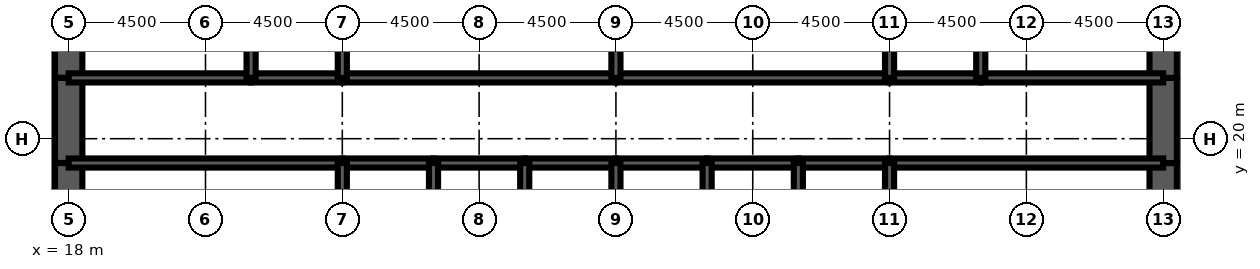
"""IFC4 building model, lengths in metres.
Left out: names, types, materials, properties, quantities, classifications, styles, units other than length and angle.
Written with IfcOpenShell. Run it as: python <this file> out.ifc"""

import sys

from ifc_helpers import new_model, si_unit, direction, frame, frame_2d, origin, place, context, subcontext, project, spatial, rectangle, extrude, element, fill, save


model = new_model("IFC4")
c1 = context("Model", 3, precision=1e-05, world=origin(), true_north=direction((0.0, 1.0)))
c2 = subcontext(c1, "Body", "Model", "MODEL_VIEW")
j1 = project(units=[si_unit("LENGTHUNIT", "METRE"), si_unit("PLANEANGLEUNIT", "RADIAN")], contexts=[c1])
p1 = place(None, origin())
s1 = spatial("IfcSite", under=j1, at=p1, CompositionType="ELEMENT")
p2 = place(p1, origin())
s2 = spatial("IfcBuilding", under=s1, at=p2, CompositionType="ELEMENT")
p3 = place(p2, frame((0.0, 0.0, 18.0)))
s3 = spatial("IfcBuildingStorey", under=s2, at=p3, CompositionType="ELEMENT", Elevation=18.0)
p4 = place(p3, frame((18.0, 26.0, 0.0), z_axis=(0.0, 0.0, 1.0), x_axis=(0.0, -1.0, 0.0)))
e1 = element("IfcWall", 1, at=p4, inside=s3, PredefinedType="SHEAR", context=c2, shape_type="SweptSolid", body=[
    extrude(rectangle(XDim=4.0, YDim=0.9, at=frame_2d((2.0, 0.0))), origin(), (0.0, 0.0, 1.0), 5.0),
])
p5 = place(p3, frame((18.0, 22.0, 0.0), z_axis=(0.0, 0.0, 1.0), x_axis=(0.0, -1.0, 0.0)))
e2 = element("IfcWall", 2, at=p5, inside=s3, PredefinedType="SHEAR", context=c2, shape_type="SweptSolid", body=[
    extrude(rectangle(XDim=2.8, YDim=0.9, at=frame_2d((1.4, 0.0))), origin(), (0.0, 0.0, 1.0), 5.0),
])
p6 = place(p5, frame((0.6, 0.0, 0.0)))
e3 = element("IfcOpeningElement", 3, at=p6, cuts=e2, PredefinedType="OPENING", context=c2, shape_type="SweptSolid", body=[
    extrude(rectangle(XDim=1.8, YDim=2.1, at=frame_2d((0.9, 1.05))), frame((0.0, 0.46, 0.0), z_axis=(0.0, -1.0, 0.0), x_axis=(1.0, 0.0, 0.0)), (0.0, 0.0, 1.0), 0.92),
])
for number, where, z_axis, x_axis in (
    (4, (18.0, 19.2, 0.0), (0.0, 0.0, 1.0), (0.0, -1.0, 0.0)),
    (5, (54.0, 16.0, 0.0), (0.0, 0.0, 1.0), (0.0, 1.0, 0.0)),
):
    element("IfcWall", number, at=place(p3, frame(where, z_axis=z_axis, x_axis=x_axis)), inside=s3, PredefinedType="SHEAR", context=c2, shape_type="SweptSolid", body=[
        extrude(rectangle(XDim=3.2, YDim=0.9, at=frame_2d((1.6, 0.0))), origin(), (0.0, 0.0, 1.0), 5.0),
    ])
p7 = place(p3, frame((54.0, 19.2, 0.0), z_axis=(0.0, 0.0, 1.0), x_axis=(0.0, 1.0, 0.0)))
e6 = element("IfcWall", 6, at=p7, inside=s3, PredefinedType="SHEAR", context=c2, shape_type="SweptSolid", body=[
    extrude(rectangle(XDim=2.8, YDim=0.9, at=frame_2d((1.4, 0.0))), origin(), (0.0, 0.0, 1.0), 5.0),
])
p8 = place(p7, frame((0.4, 0.0, 0.0)))
e7 = element("IfcOpeningElement", 7, at=p8, cuts=e6, PredefinedType="OPENING", context=c2, shape_type="SweptSolid", body=[
    extrude(rectangle(XDim=1.8, YDim=2.1, at=frame_2d((0.9, 1.05))), frame((0.0, 0.46, 0.0), z_axis=(0.0, -1.0, 0.0), x_axis=(1.0, 0.0, 0.0)), (0.0, 0.0, 1.0), 0.92),
])
p9 = place(p3, frame((54.0, 22.0, 0.0), z_axis=(0.0, 0.0, 1.0), x_axis=(0.0, 1.0, 0.0)))
e8 = element("IfcWall", 8, at=p9, inside=s3, PredefinedType="SHEAR", context=c2, shape_type="SweptSolid", body=[
    extrude(rectangle(XDim=4.0, YDim=0.9, at=frame_2d((2.0, 0.0))), origin(), (0.0, 0.0, 1.0), 5.0),
])
p10 = place(p3, frame((18.0, 19.2, 0.0), z_axis=(0.0, 0.0, 1.0), x_axis=(1.0, 0.0, 0.0)))
e9 = element("IfcWall", 9, at=p10, inside=s3, PredefinedType="SOLIDWALL", context=c2, shape_type="SweptSolid", body=[
    extrude(rectangle(XDim=9.0, YDim=0.3, at=frame_2d((4.5, 0.0))), origin(), (0.0, 0.0, 1.0), 5.0),
])
p11 = place(p10, frame((0.65, 0.0, 0.0)))
e10 = element("IfcOpeningElement", 10, at=p11, cuts=e9, PredefinedType="OPENING", context=c2, shape_type="SweptSolid", body=[
    extrude(rectangle(XDim=1.0, YDim=2.1, at=frame_2d((0.5, 1.05))), frame((0.0, 0.16, 0.0), z_axis=(0.0, -1.0, 0.0), x_axis=(1.0, 0.0, 0.0)), (0.0, 0.0, 1.0), 0.32),
])
p12 = place(p3, frame((27.0, 19.2, 0.0), z_axis=(0.0, 0.0, 1.0), x_axis=(1.0, 0.0, 0.0)))
e11 = element("IfcWall", 11, at=p12, inside=s3, PredefinedType="SOLIDWALL", context=c2, shape_type="SweptSolid", body=[
    extrude(rectangle(XDim=3.0, YDim=0.3, at=frame_2d((1.5, 0.0))), origin(), (0.0, 0.0, 1.0), 5.0),
])
p13 = place(p12, frame((0.95, 0.0, 0.0)))
e12 = element("IfcOpeningElement", 12, at=p13, cuts=e11, PredefinedType="OPENING", context=c2, shape_type="SweptSolid", body=[
    extrude(rectangle(XDim=1.1, YDim=2.2, at=frame_2d((0.55, 1.1))), frame((0.0, 0.16, 0.0), z_axis=(0.0, -1.0, 0.0), x_axis=(1.0, 0.0, 0.0)), (0.0, 0.0, 1.0), 0.32),
])
p14 = place(p3, frame((30.0, 19.2, 0.0), z_axis=(0.0, 0.0, 1.0), x_axis=(1.0, 0.0, 0.0)))
e13 = element("IfcWall", 13, at=p14, inside=s3, PredefinedType="SOLIDWALL", context=c2, shape_type="SweptSolid", body=[
    extrude(rectangle(XDim=3.0, YDim=0.3, at=frame_2d((1.5, 0.0))), origin(), (0.0, 0.0, 1.0), 5.0),
])
p15 = place(p14, frame((0.95, 0.0, 0.0)))
e14 = element("IfcOpeningElement", 14, at=p15, cuts=e13, PredefinedType="OPENING", context=c2, shape_type="SweptSolid", body=[
    extrude(rectangle(XDim=1.1, YDim=2.2, at=frame_2d((0.55, 1.1))), frame((0.0, 0.16, 0.0), z_axis=(0.0, -1.0, 0.0), x_axis=(1.0, 0.0, 0.0)), (0.0, 0.0, 1.0), 0.32),
])
p16 = place(p3, frame((33.0, 19.2, 0.0), z_axis=(0.0, 0.0, 1.0), x_axis=(1.0, 0.0, 0.0)))
e15 = element("IfcWall", 15, at=p16, inside=s3, PredefinedType="SOLIDWALL", context=c2, shape_type="SweptSolid", body=[
    extrude(rectangle(XDim=3.0, YDim=0.3, at=frame_2d((1.5, 0.0))), origin(), (0.0, 0.0, 1.0), 5.0),
])
p17 = place(p16, frame((0.95, 0.0, 0.0)))
e16 = element("IfcOpeningElement", 16, at=p17, cuts=e15, PredefinedType="OPENING", context=c2, shape_type="SweptSolid", body=[
    extrude(rectangle(XDim=1.1, YDim=2.2, at=frame_2d((0.55, 1.1))), frame((0.0, 0.16, 0.0), z_axis=(0.0, -1.0, 0.0), x_axis=(1.0, 0.0, 0.0)), (0.0, 0.0, 1.0), 0.32),
])
p18 = place(p3, frame((36.0, 19.2, 0.0), z_axis=(0.0, 0.0, 1.0), x_axis=(1.0, 0.0, 0.0)))
e17 = element("IfcWall", 17, at=p18, inside=s3, PredefinedType="SOLIDWALL", context=c2, shape_type="SweptSolid", body=[
    extrude(rectangle(XDim=3.0, YDim=0.3, at=frame_2d((1.5, 0.0))), origin(), (0.0, 0.0, 1.0), 5.0),
])
p19 = place(p18, frame((0.95, 0.0, 0.0)))
e18 = element("IfcOpeningElement", 18, at=p19, cuts=e17, PredefinedType="OPENING", context=c2, shape_type="SweptSolid", body=[
    extrude(rectangle(XDim=1.1, YDim=2.2, at=frame_2d((0.55, 1.1))), frame((0.0, 0.16, 0.0), z_axis=(0.0, -1.0, 0.0), x_axis=(1.0, 0.0, 0.0)), (0.0, 0.0, 1.0), 0.32),
])
for number, where, z_axis, x_axis in (
    (19, (39.0, 19.2, 0.0), (0.0, 0.0, 1.0), (1.0, 0.0, 0.0)),
    (20, (42.0, 19.2, 0.0), (0.0, 0.0, 1.0), (1.0, 0.0, 0.0)),
):
    element("IfcWall", number, at=place(p3, frame(where, z_axis=z_axis, x_axis=x_axis)), inside=s3, PredefinedType="SOLIDWALL", context=c2, shape_type="SweptSolid", body=[
        extrude(rectangle(XDim=3.0, YDim=0.3, at=frame_2d((1.5, 0.0))), origin(), (0.0, 0.0, 1.0), 5.0),
    ])
p20 = place(p3, frame((45.0, 19.2, 0.0), z_axis=(0.0, 0.0, 1.0), x_axis=(1.0, 0.0, 0.0)))
e21 = element("IfcWall", 21, at=p20, inside=s3, PredefinedType="SOLIDWALL", context=c2, shape_type="SweptSolid", body=[
    extrude(rectangle(XDim=9.0, YDim=0.3, at=frame_2d((4.5, 0.0))), origin(), (0.0, 0.0, 1.0), 5.0),
])
p21 = place(p20, frame((7.35, 0.0, 0.0)))
e22 = element("IfcOpeningElement", 22, at=p21, cuts=e21, PredefinedType="OPENING", context=c2, shape_type="SweptSolid", body=[
    extrude(rectangle(XDim=1.0, YDim=2.1, at=frame_2d((0.5, 1.05))), frame((0.0, 0.16, 0.0), z_axis=(0.0, -1.0, 0.0), x_axis=(1.0, 0.0, 0.0)), (0.0, 0.0, 1.0), 0.32),
])
p22 = place(p3, frame((18.0, 22.0, 0.0), z_axis=(0.0, 0.0, 1.0), x_axis=(1.0, 0.0, 0.0)))
e23 = element("IfcWall", 23, at=p22, inside=s3, PredefinedType="SOLIDWALL", context=c2, shape_type="SweptSolid", body=[
    extrude(rectangle(XDim=6.0, YDim=0.3, at=frame_2d((3.0, 0.0))), origin(), (0.0, 0.0, 1.0), 5.0),
])
p23 = place(p22, frame((4.4, 0.0, 0.0)))
e24 = element("IfcOpeningElement", 24, at=p23, cuts=e23, PredefinedType="OPENING", context=c2, shape_type="SweptSolid", body=[
    extrude(rectangle(XDim=1.0, YDim=2.1, at=frame_2d((0.5, 1.05))), frame((0.0, 0.16, 0.0), z_axis=(0.0, -1.0, 0.0), x_axis=(1.0, 0.0, 0.0)), (0.0, 0.0, 1.0), 0.32),
])
p24 = place(p22, frame((1.0, 0.0, 0.0)))
e25 = element("IfcOpeningElement", 25, at=p24, cuts=e23, PredefinedType="OPENING", context=c2, shape_type="SweptSolid", body=[
    extrude(rectangle(XDim=1.0, YDim=2.1, at=frame_2d((0.5, 1.05))), frame((0.0, 0.16, 0.0), z_axis=(0.0, -1.0, 0.0), x_axis=(1.0, 0.0, 0.0)), (0.0, 0.0, 1.0), 0.32),
])
p25 = place(p3, frame((24.0, 22.0, 0.0), z_axis=(0.0, 0.0, 1.0), x_axis=(1.0, 0.0, 0.0)))
e26 = element("IfcWall", 26, at=p25, inside=s3, PredefinedType="SOLIDWALL", context=c2, shape_type="SweptSolid", body=[
    extrude(rectangle(XDim=3.0, YDim=0.3, at=frame_2d((1.5, 0.0))), origin(), (0.0, 0.0, 1.0), 5.0),
])
p26 = place(p25, frame((1.0, 0.0, 0.0)))
e27 = element("IfcOpeningElement", 27, at=p26, cuts=e26, PredefinedType="OPENING", context=c2, shape_type="SweptSolid", body=[
    extrude(rectangle(XDim=1.0, YDim=2.1, at=frame_2d((0.5, 1.05))), frame((0.0, 0.16, 0.0), z_axis=(0.0, -1.0, 0.0), x_axis=(1.0, 0.0, 0.0)), (0.0, 0.0, 1.0), 0.32),
])
p27 = place(p3, frame((27.0, 22.0, 0.0), z_axis=(0.0, 0.0, 1.0), x_axis=(1.0, 0.0, 0.0)))
e28 = element("IfcWall", 28, at=p27, inside=s3, PredefinedType="SOLIDWALL", context=c2, shape_type="SweptSolid", body=[
    extrude(rectangle(XDim=9.0, YDim=0.3, at=frame_2d((4.5, 0.0))), origin(), (0.0, 0.0, 1.0), 5.0),
])
p28 = place(p27, frame((4.0, 0.0, 0.0)))
e29 = element("IfcOpeningElement", 29, at=p28, cuts=e28, PredefinedType="OPENING", context=c2, shape_type="SweptSolid", body=[
    extrude(rectangle(XDim=1.0, YDim=2.1, at=frame_2d((0.5, 1.05))), frame((0.0, 0.16, 0.0), z_axis=(0.0, -1.0, 0.0), x_axis=(1.0, 0.0, 0.0)), (0.0, 0.0, 1.0), 0.32),
])
p29 = place(p3, frame((36.0, 22.0, 0.0), z_axis=(0.0, 0.0, 1.0), x_axis=(1.0, 0.0, 0.0)))
e30 = element("IfcWall", 30, at=p29, inside=s3, PredefinedType="SOLIDWALL", context=c2, shape_type="SweptSolid", body=[
    extrude(rectangle(XDim=9.0, YDim=0.3, at=frame_2d((4.5, 0.0))), origin(), (0.0, 0.0, 1.0), 5.0),
])
p30 = place(p29, frame((4.0, 0.0, 0.0)))
e31 = element("IfcOpeningElement", 31, at=p30, cuts=e30, PredefinedType="OPENING", context=c2, shape_type="SweptSolid", body=[
    extrude(rectangle(XDim=1.0, YDim=2.1, at=frame_2d((0.5, 1.05))), frame((0.0, 0.16, 0.0), z_axis=(0.0, -1.0, 0.0), x_axis=(1.0, 0.0, 0.0)), (0.0, 0.0, 1.0), 0.32),
])
p31 = place(p3, frame((45.0, 22.0, 0.0), z_axis=(0.0, 0.0, 1.0), x_axis=(1.0, 0.0, 0.0)))
e32 = element("IfcWall", 32, at=p31, inside=s3, PredefinedType="SOLIDWALL", context=c2, shape_type="SweptSolid", body=[
    extrude(rectangle(XDim=3.0, YDim=0.3, at=frame_2d((1.5, 0.0))), origin(), (0.0, 0.0, 1.0), 5.0),
])
p32 = place(p31, frame((1.0, 0.0, 0.0)))
e33 = element("IfcOpeningElement", 33, at=p32, cuts=e32, PredefinedType="OPENING", context=c2, shape_type="SweptSolid", body=[
    extrude(rectangle(XDim=1.0, YDim=2.1, at=frame_2d((0.5, 1.05))), frame((0.0, 0.16, 0.0), z_axis=(0.0, -1.0, 0.0), x_axis=(1.0, 0.0, 0.0)), (0.0, 0.0, 1.0), 0.32),
])
p33 = place(p3, frame((48.0, 22.0, 0.0), z_axis=(0.0, 0.0, 1.0), x_axis=(1.0, 0.0, 0.0)))
e34 = element("IfcWall", 34, at=p33, inside=s3, PredefinedType="SOLIDWALL", context=c2, shape_type="SweptSolid", body=[
    extrude(rectangle(XDim=6.0, YDim=0.3, at=frame_2d((3.0, 0.0))), origin(), (0.0, 0.0, 1.0), 5.0),
])
p34 = place(p33, frame((2.0, 0.0, 0.0)))
e35 = element("IfcOpeningElement", 35, at=p34, cuts=e34, PredefinedType="OPENING", context=c2, shape_type="SweptSolid", body=[
    extrude(rectangle(XDim=1.0, YDim=2.1, at=frame_2d((0.5, 1.05))), frame((0.0, 0.16, 0.0), z_axis=(0.0, -1.0, 0.0), x_axis=(1.0, 0.0, 0.0)), (0.0, 0.0, 1.0), 0.32),
])
p35 = place(p33, frame((4.0, 0.0, 0.0)))
e36 = element("IfcOpeningElement", 36, at=p35, cuts=e34, PredefinedType="OPENING", context=c2, shape_type="SweptSolid", body=[
    extrude(rectangle(XDim=1.0, YDim=2.1, at=frame_2d((0.5, 1.05))), frame((0.0, 0.16, 0.0), z_axis=(0.0, -1.0, 0.0), x_axis=(1.0, 0.0, 0.0)), (0.0, 0.0, 1.0), 0.32),
])
for number, where, z_axis, x_axis in (
    (37, (27.0, 16.0, 0.0), (0.0, 0.0, 1.0), (0.0, 1.0, 0.0)),
    (38, (30.0, 16.0, 0.0), (0.0, 0.0, 1.0), (0.0, 1.0, 0.0)),
    (39, (33.0, 16.0, 0.0), (0.0, 0.0, 1.0), (0.0, 1.0, 0.0)),
    (40, (36.0, 16.0, 0.0), (0.0, 0.0, 1.0), (0.0, 1.0, 0.0)),
    (41, (39.0, 16.0, 0.0), (0.0, 0.0, 1.0), (0.0, 1.0, 0.0)),
    (42, (42.0, 16.0, 0.0), (0.0, 0.0, 1.0), (0.0, 1.0, 0.0)),
    (43, (45.0, 16.0, 0.0), (0.0, 0.0, 1.0), (0.0, 1.0, 0.0)),
):
    element("IfcWall", number, at=place(p3, frame(where, z_axis=z_axis, x_axis=x_axis)), inside=s3, PredefinedType="SOLIDWALL", context=c2, shape_type="SweptSolid", body=[
        extrude(rectangle(XDim=3.2, YDim=0.3, at=frame_2d((1.6, 0.0))), origin(), (0.0, 0.0, 1.0), 5.0),
    ])
for number, where, z_axis, x_axis in (
    (44, (24.0, 22.0, 0.0), (0.0, 0.0, 1.0), (0.0, 1.0, 0.0)),
    (45, (27.0, 22.0, 0.0), (0.0, 0.0, 1.0), (0.0, 1.0, 0.0)),
    (46, (36.0, 22.0, 0.0), (0.0, 0.0, 1.0), (0.0, 1.0, 0.0)),
    (47, (45.0, 22.0, 0.0), (0.0, 0.0, 1.0), (0.0, 1.0, 0.0)),
    (48, (48.0, 22.0, 0.0), (0.0, 0.0, 1.0), (0.0, 1.0, 0.0)),
):
    element("IfcWall", number, at=place(p3, frame(where, z_axis=z_axis, x_axis=x_axis)), inside=s3, PredefinedType="SOLIDWALL", context=c2, shape_type="SweptSolid", body=[
        extrude(rectangle(XDim=4.0, YDim=0.3, at=frame_2d((2.0, 0.0))), origin(), (0.0, 0.0, 1.0), 5.0),
    ])
p36 = place(p3, frame((42.5, 22.15, 0.0), z_axis=(0.0, 0.0, 1.0), x_axis=(0.0, 1.0, 0.0)))
e49 = element("IfcWall", 49, at=p36, inside=s3, PredefinedType="PARTITIONING", context=c2, shape_type="SweptSolid", body=[
    extrude(rectangle(XDim=3.7, YDim=0.15, at=frame_2d((1.85, 0.0))), origin(), (0.0, 0.0, 1.0), 3.0),
])
p37 = place(p36, frame((2.2, 0.0, 0.0)))
e50 = element("IfcOpeningElement", 50, at=p37, cuts=e49, PredefinedType="OPENING", context=c2, shape_type="SweptSolid", body=[
    extrude(rectangle(XDim=1.0, YDim=2.1, at=frame_2d((0.5, 1.05))), frame((0.0, 0.085, 0.0), z_axis=(0.0, -1.0, 0.0), x_axis=(1.0, 0.0, 0.0)), (0.0, 0.0, 1.0), 0.17),
])
for number, where, z_axis, x_axis in (
    (51, (20.625, 22.15, 0.0), (0.0, 0.0, 1.0), (0.0, 1.0, 0.0)),
    (52, (51.375, 22.15, 0.0), (0.0, 0.0, 1.0), (0.0, 1.0, 0.0)),
):
    element("IfcWall", number, at=place(p3, frame(where, z_axis=z_axis, x_axis=x_axis)), inside=s3, PredefinedType="PARTITIONING", context=c2, shape_type="SweptSolid", body=[
        extrude(rectangle(XDim=3.7, YDim=0.15, at=frame_2d((1.85, 0.0))), origin(), (0.0, 0.0, 1.0), 3.0),
    ])
p38 = place(p3, frame((24.5, 19.35, 0.0), z_axis=(0.0, 0.0, 1.0), x_axis=(0.0, 1.0, 0.0)))
e53 = element("IfcWall", 53, at=p38, inside=s3, PredefinedType="PARTITIONING", context=c2, shape_type="SweptSolid", body=[
    extrude(rectangle(XDim=2.5, YDim=0.15, at=frame_2d((1.25, 0.0))), origin(), (0.0, 0.0, 1.0), 3.0),
])
p39 = place(p38, frame((1.15, 0.0, 0.0)))
e54 = element("IfcOpeningElement", 54, at=p39, cuts=e53, PredefinedType="OPENING", context=c2, shape_type="SweptSolid", body=[
    extrude(rectangle(XDim=1.0, YDim=2.1, at=frame_2d((0.5, 1.05))), frame((0.0, 0.085, 0.0), z_axis=(0.0, -1.0, 0.0), x_axis=(1.0, 0.0, 0.0)), (0.0, 0.0, 1.0), 0.17),
])
p40 = place(p39, origin())
e55 = element("IfcDoor", 55, at=p40, inside=s3, OperationType="SINGLE_SWING_RIGHT", PredefinedType="DOOR", context=c2, shape_type="SweptSolid", body=[
    extrude(rectangle(XDim=1.0, YDim=2.1, at=frame_2d((0.5, 1.05))), frame((0.0, 0.025, 0.0), z_axis=(0.0, -1.0, 0.0), x_axis=(1.0, 0.0, 0.0)), (0.0, 0.0, 1.0), 0.05),
])
fill(e54, e55)
p41 = place(p13, origin())
e56 = element("IfcDoor", 56, at=p41, inside=s3, OperationType="DOUBLE_DOOR_SLIDING", PredefinedType="USERDEFINED", context=c2, shape_type="SweptSolid", body=[
    extrude(rectangle(XDim=1.1, YDim=2.2, at=frame_2d((0.55, 1.1))), frame((0.0, 0.025, 0.0), z_axis=(0.0, -1.0, 0.0), x_axis=(1.0, 0.0, 0.0)), (0.0, 0.0, 1.0), 0.05),
])
fill(e12, e56)
p42 = place(p15, origin())
e57 = element("IfcDoor", 57, at=p42, inside=s3, OperationType="DOUBLE_DOOR_SLIDING", PredefinedType="USERDEFINED", context=c2, shape_type="SweptSolid", body=[
    extrude(rectangle(XDim=1.1, YDim=2.2, at=frame_2d((0.55, 1.1))), frame((0.0, 0.025, 0.0), z_axis=(0.0, -1.0, 0.0), x_axis=(1.0, 0.0, 0.0)), (0.0, 0.0, 1.0), 0.05),
])
fill(e14, e57)
p43 = place(p17, origin())
e58 = element("IfcDoor", 58, at=p43, inside=s3, OperationType="DOUBLE_DOOR_SLIDING", PredefinedType="USERDEFINED", context=c2, shape_type="SweptSolid", body=[
    extrude(rectangle(XDim=1.1, YDim=2.2, at=frame_2d((0.55, 1.1))), frame((0.0, 0.025, 0.0), z_axis=(0.0, -1.0, 0.0), x_axis=(1.0, 0.0, 0.0)), (0.0, 0.0, 1.0), 0.05),
])
fill(e16, e58)
p44 = place(p19, origin())
e59 = element("IfcDoor", 59, at=p44, inside=s3, OperationType="DOUBLE_DOOR_SLIDING", PredefinedType="USERDEFINED", context=c2, shape_type="SweptSolid", body=[
    extrude(rectangle(XDim=1.1, YDim=2.2, at=frame_2d((0.55, 1.1))), frame((0.0, 0.025, 0.0), z_axis=(0.0, -1.0, 0.0), x_axis=(1.0, 0.0, 0.0)), (0.0, 0.0, 1.0), 0.05),
])
fill(e18, e59)
p45 = place(p11, origin())
e60 = element("IfcDoor", 60, at=p45, inside=s3, OperationType="SINGLE_SWING_LEFT", PredefinedType="DOOR", context=c2, shape_type="SweptSolid", body=[
    extrude(rectangle(XDim=1.0, YDim=2.1, at=frame_2d((0.5, 1.05))), frame((0.0, 0.025, 0.0), z_axis=(0.0, -1.0, 0.0), x_axis=(1.0, 0.0, 0.0)), (0.0, 0.0, 1.0), 0.05),
])
fill(e10, e60)
p46 = place(p21, origin())
e61 = element("IfcDoor", 61, at=p46, inside=s3, OperationType="SINGLE_SWING_RIGHT", PredefinedType="DOOR", context=c2, shape_type="SweptSolid", body=[
    extrude(rectangle(XDim=1.0, YDim=2.1, at=frame_2d((0.5, 1.05))), frame((0.0, 0.025, 0.0), z_axis=(0.0, -1.0, 0.0), x_axis=(1.0, 0.0, 0.0)), (0.0, 0.0, 1.0), 0.05),
])
fill(e22, e61)
p47 = place(p6, origin())
e62 = element("IfcDoor", 62, at=p47, inside=s3, OperationType="SINGLE_SWING_LEFT", PredefinedType="DOOR", context=c2, shape_type="SweptSolid", body=[
    extrude(rectangle(XDim=1.8, YDim=2.1, at=frame_2d((0.9, 1.05))), frame((0.0, 0.45, 0.0), z_axis=(0.0, -1.0, 0.0), x_axis=(1.0, 0.0, 0.0)), (0.0, 0.0, 1.0), 0.899),
])
fill(e3, e62)
p48 = place(p8, origin())
e63 = element("IfcDoor", 63, at=p48, inside=s3, OperationType="SINGLE_SWING_LEFT", PredefinedType="DOOR", context=c2, shape_type="SweptSolid", body=[
    extrude(rectangle(XDim=1.8, YDim=2.1, at=frame_2d((0.9, 1.05))), frame((0.0, 0.45, 0.0), z_axis=(0.0, -1.0, 0.0), x_axis=(1.0, 0.0, 0.0)), (0.0, 0.0, 1.0), 0.899),
])
fill(e7, e63)
p49 = place(p23, origin())
e64 = element("IfcDoor", 64, at=p49, inside=s3, OperationType="SINGLE_SWING_RIGHT", PredefinedType="DOOR", context=c2, shape_type="SweptSolid", body=[
    extrude(rectangle(XDim=1.0, YDim=2.1, at=frame_2d((0.5, 1.05))), frame((0.0, 0.025, 0.0), z_axis=(0.0, -1.0, 0.0), x_axis=(1.0, 0.0, 0.0)), (0.0, 0.0, 1.0), 0.05),
])
fill(e24, e64)
p50 = place(p26, origin())
e65 = element("IfcDoor", 65, at=p50, inside=s3, OperationType="SINGLE_SWING_LEFT", PredefinedType="DOOR", context=c2, shape_type="SweptSolid", body=[
    extrude(rectangle(XDim=1.0, YDim=2.1, at=frame_2d((0.5, 1.05))), frame((0.0, 0.025, 0.0), z_axis=(0.0, -1.0, 0.0), x_axis=(1.0, 0.0, 0.0)), (0.0, 0.0, 1.0), 0.05),
])
fill(e27, e65)
p51 = place(p28, origin())
e66 = element("IfcDoor", 66, at=p51, inside=s3, OperationType="SINGLE_SWING_LEFT", PredefinedType="DOOR", context=c2, shape_type="SweptSolid", body=[
    extrude(rectangle(XDim=1.0, YDim=2.1, at=frame_2d((0.5, 1.05))), frame((0.0, 0.025, 0.0), z_axis=(0.0, -1.0, 0.0), x_axis=(1.0, 0.0, 0.0)), (0.0, 0.0, 1.0), 0.05),
])
fill(e29, e66)
p52 = place(p30, origin())
e67 = element("IfcDoor", 67, at=p52, inside=s3, OperationType="SINGLE_SWING_LEFT", PredefinedType="DOOR", context=c2, shape_type="SweptSolid", body=[
    extrude(rectangle(XDim=1.0, YDim=2.1, at=frame_2d((0.5, 1.05))), frame((0.0, 0.025, 0.0), z_axis=(0.0, -1.0, 0.0), x_axis=(1.0, 0.0, 0.0)), (0.0, 0.0, 1.0), 0.05),
])
fill(e31, e67)
p53 = place(p32, origin())
e68 = element("IfcDoor", 68, at=p53, inside=s3, OperationType="SINGLE_SWING_LEFT", PredefinedType="DOOR", context=c2, shape_type="SweptSolid", body=[
    extrude(rectangle(XDim=1.0, YDim=2.1, at=frame_2d((0.5, 1.05))), frame((0.0, 0.025, 0.0), z_axis=(0.0, -1.0, 0.0), x_axis=(1.0, 0.0, 0.0)), (0.0, 0.0, 1.0), 0.05),
])
fill(e33, e68)
p54 = place(p34, origin())
e69 = element("IfcDoor", 69, at=p54, inside=s3, OperationType="SINGLE_SWING_LEFT", PredefinedType="DOOR", context=c2, shape_type="SweptSolid", body=[
    extrude(rectangle(XDim=1.0, YDim=2.1, at=frame_2d((0.5, 1.05))), frame((0.0, 0.025, 0.0), z_axis=(0.0, -1.0, 0.0), x_axis=(1.0, 0.0, 0.0)), (0.0, 0.0, 1.0), 0.05),
])
fill(e35, e69)
p55 = place(p24, origin())
e70 = element("IfcDoor", 70, at=p55, inside=s3, OperationType="SINGLE_SWING_LEFT", PredefinedType="DOOR", context=c2, shape_type="SweptSolid", body=[
    extrude(rectangle(XDim=1.0, YDim=2.1, at=frame_2d((0.5, 1.05))), frame((0.0, 0.025, 0.0), z_axis=(0.0, -1.0, 0.0), x_axis=(1.0, 0.0, 0.0)), (0.0, 0.0, 1.0), 0.05),
])
fill(e25, e70)
p56 = place(p35, origin())
e71 = element("IfcDoor", 71, at=p56, inside=s3, OperationType="SINGLE_SWING_RIGHT", PredefinedType="DOOR", context=c2, shape_type="SweptSolid", body=[
    extrude(rectangle(XDim=1.0, YDim=2.1, at=frame_2d((0.5, 1.05))), frame((0.0, 0.025, 0.0), z_axis=(0.0, -1.0, 0.0), x_axis=(1.0, 0.0, 0.0)), (0.0, 0.0, 1.0), 0.05),
])
fill(e36, e71)
save(model, sys.argv[1])
